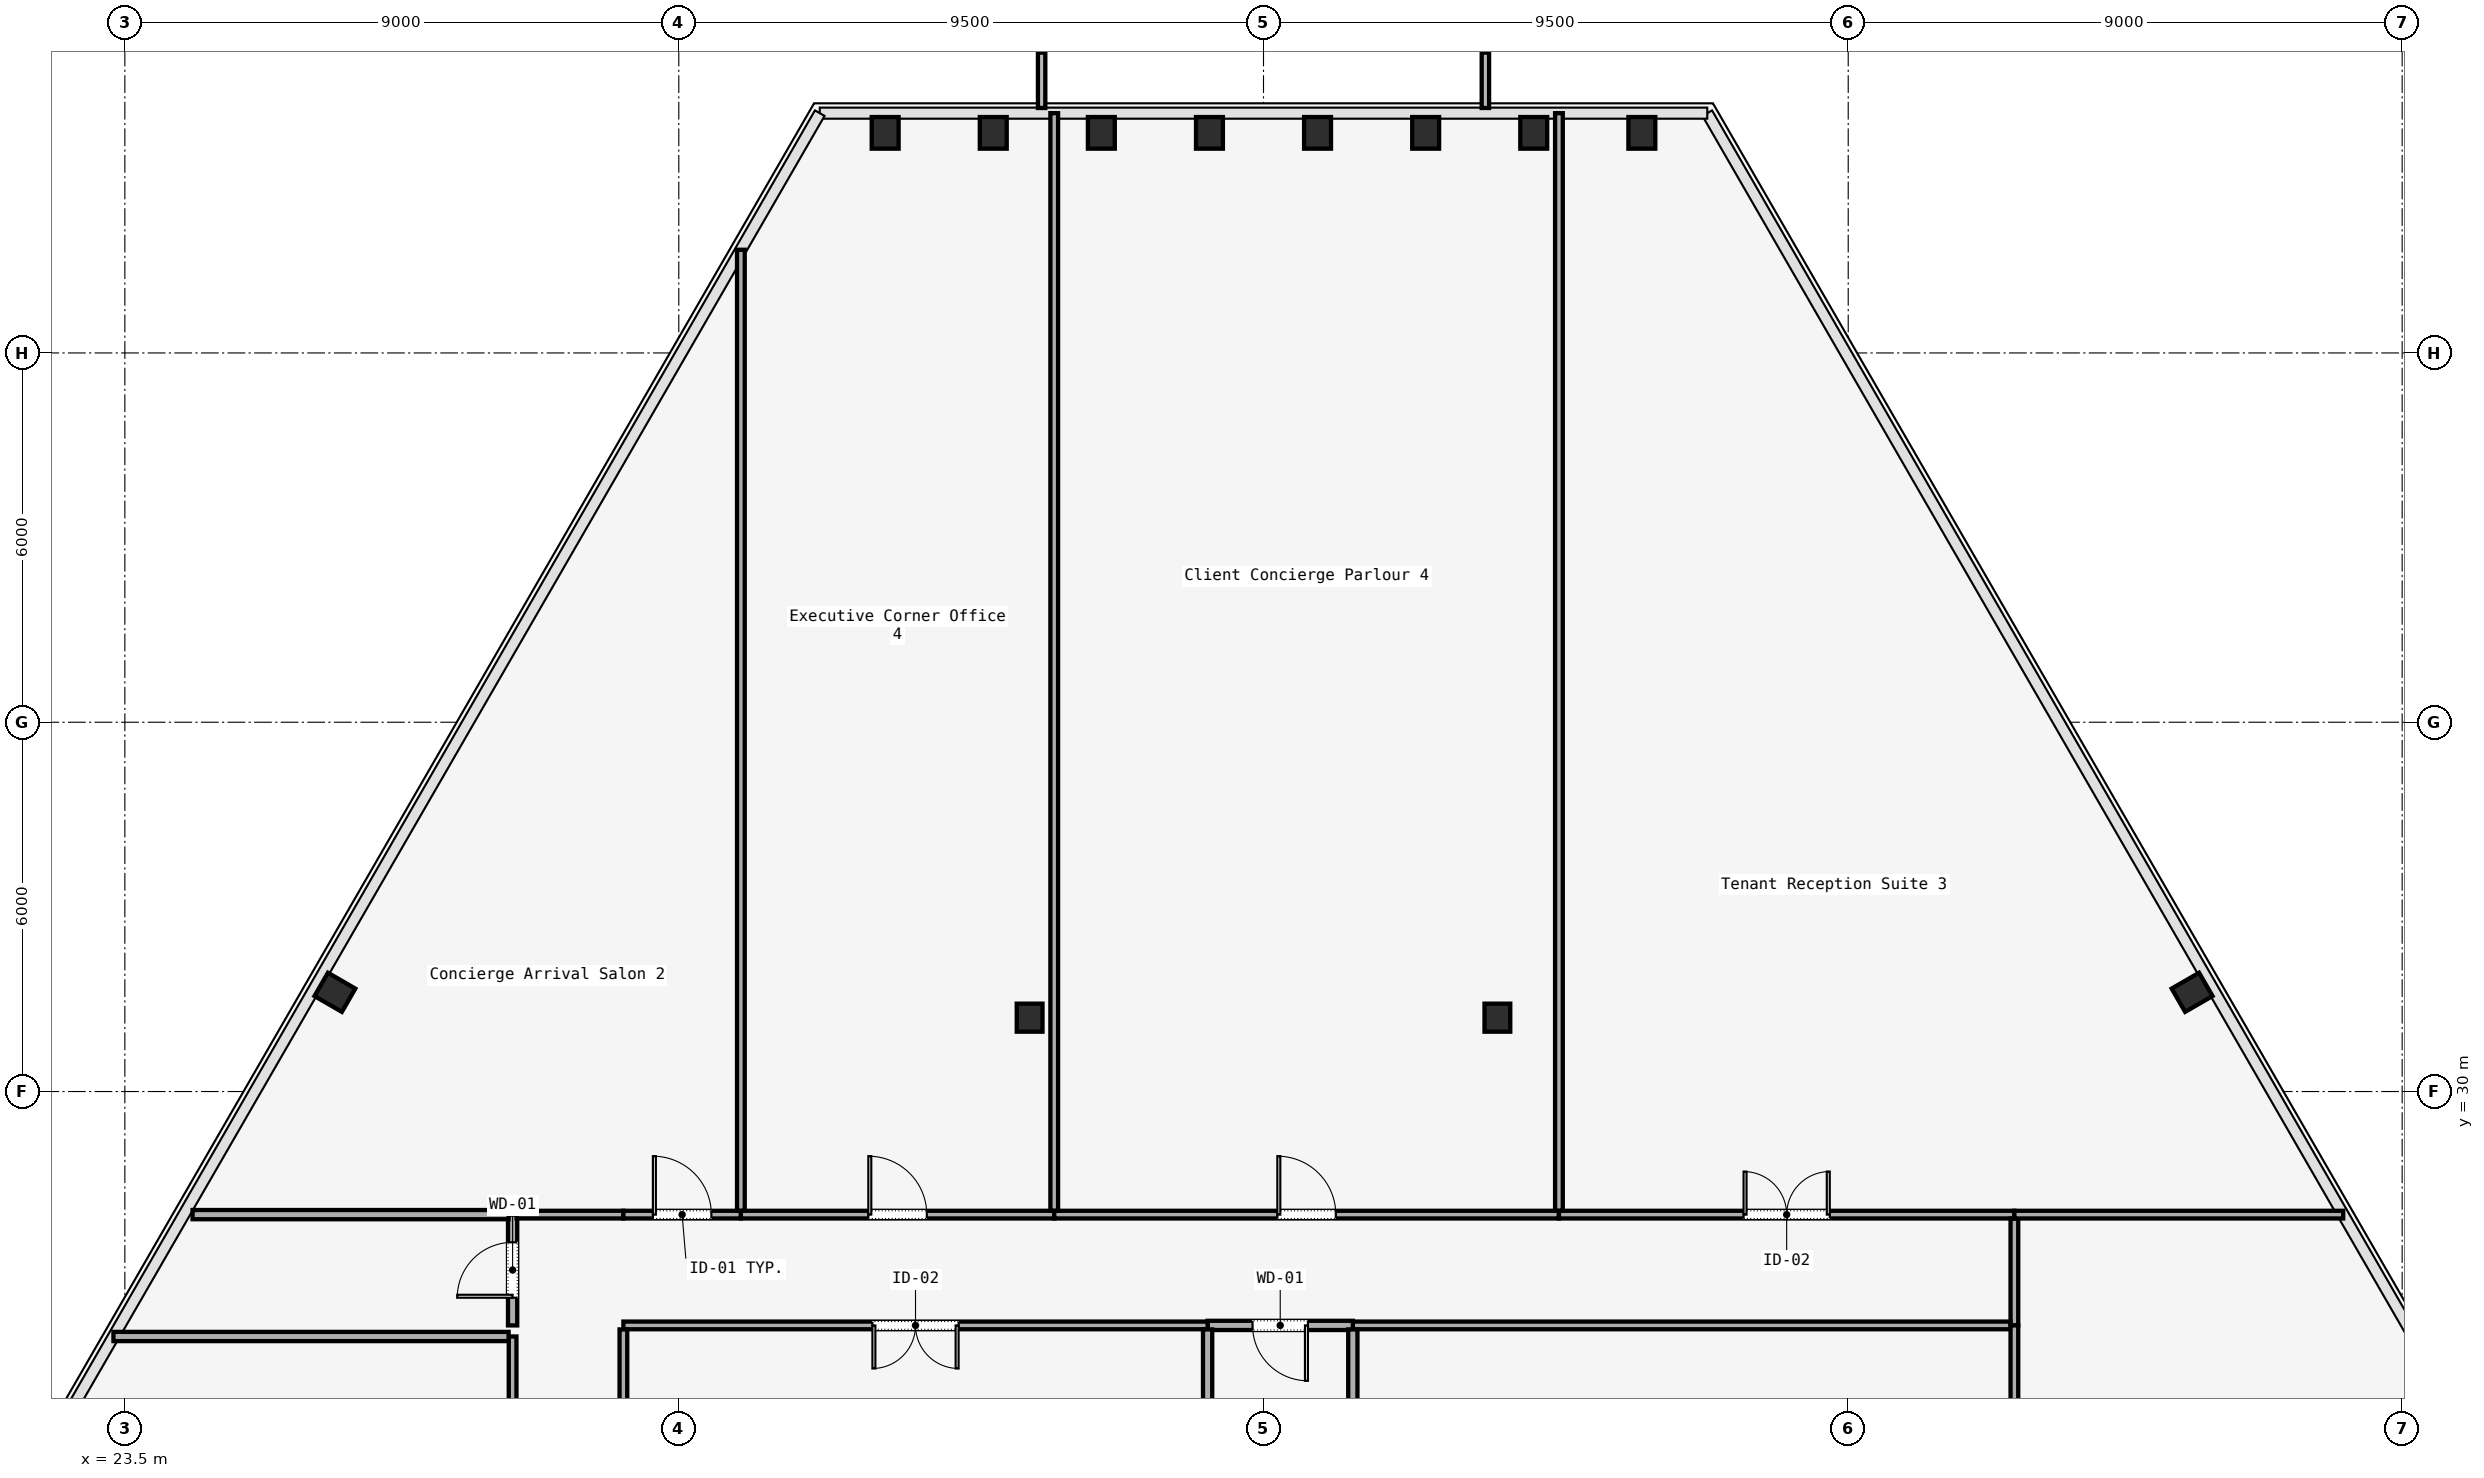
"""IFC4 building model, lengths in metres.
Left out: names, types, materials, properties, quantities, classifications, styles, units other than length and angle.
Written with IfcOpenShell. Run it as: python <this file> out.ifc"""

import sys

from ifc_helpers import new_model, si_unit, direction, frame, frame_2d, origin, origin_2d, place, context, subcontext, project, spatial, rectangle, i_section, extrude, element, fill, save


model = new_model("IFC4")
c1 = context("Model", 3, precision=1e-05, world=origin(), true_north=direction((0.0, 1.0)))
c2 = subcontext(c1, "Body", "Model", "MODEL_VIEW")
j1 = project(units=[si_unit("LENGTHUNIT", "METRE"), si_unit("PLANEANGLEUNIT", "RADIAN")], contexts=[c1])
p1 = place(None, origin())
s1 = spatial("IfcSite", under=j1, at=p1, CompositionType="ELEMENT")
p2 = place(p1, origin())
s2 = spatial("IfcBuilding", under=s1, at=p2, CompositionType="ELEMENT")
p3 = place(p2, frame((0.0, 0.0, 85.4)))
s3 = spatial("IfcBuildingStorey", under=s2, at=p3, CompositionType="ELEMENT", Elevation=85.4)
for number, where, z_axis, x_axis in (
    (1, (38.2, 31.2, 0.0), (0.0, 0.0, 1.0), (1.0, 0.0, 0.0)),
    (2, (45.8, 31.2, 0.0), (0.0, 0.0, 1.0), (1.0, 0.0, 0.0)),
):
    element("IfcColumn", number, at=place(p3, frame(where, z_axis=z_axis, x_axis=x_axis)), inside=s3, PredefinedType="COLUMN", context=c2, shape_type="SweptSolid", body=[
        extrude(i_section(OverallWidth=0.418, OverallDepth=0.456, WebThickness=0.042, FlangeThickness=0.067, FilletRadius=0.015, at=origin_2d()), origin(), (0.0, 0.0, 1.0), 3.58),
    ])
for number, where, z_axis, x_axis in (
    (3, (57.087, 31.612, 0.0), (0.0, 0.0, 1.0), (-0.5, 0.866, 0.0)),
    (4, (48.147, 45.576, 0.0), (0.0, 0.0, 1.0), (1.0, 0.0, 0.0)),
    (5, (46.391, 45.576, 0.0), (0.0, 0.0, 1.0), (1.0, 0.0, 0.0)),
    (6, (44.635, 45.576, 0.0), (0.0, 0.0, 1.0), (1.0, 0.0, 0.0)),
    (7, (42.878, 45.576, 0.0), (0.0, 0.0, 1.0), (1.0, 0.0, 0.0)),
    (8, (41.122, 45.576, 0.0), (0.0, 0.0, 1.0), (1.0, 0.0, 0.0)),
    (9, (39.365, 45.576, 0.0), (0.0, 0.0, 1.0), (1.0, 0.0, 0.0)),
    (10, (37.609, 45.576, 0.0), (0.0, 0.0, 1.0), (1.0, 0.0, 0.0)),
    (11, (35.853, 45.576, 0.0), (0.0, 0.0, 1.0), (1.0, 0.0, 0.0)),
    (12, (26.913, 31.612, 0.0), (0.0, 0.0, 1.0), (0.5, 0.866, 0.0)),
):
    element("IfcColumn", number, at=place(p3, frame(where, z_axis=z_axis, x_axis=x_axis)), inside=s3, PredefinedType="COLUMN", context=c2, shape_type="SweptSolid", body=[
        extrude(i_section(OverallWidth=0.437, OverallDepth=0.514, WebThickness=0.061, FlangeThickness=0.077, FilletRadius=0.015, at=origin_2d()), origin(), (0.0, 0.0, 1.0), 3.58),
    ])
p4 = place(p3, frame((29.8, 17.065, 0.0), z_axis=(0.0, 0.0, 1.0), x_axis=(0.0, 1.0, 0.0)))
e13 = element("IfcWall", 13, at=p4, inside=s3, PredefinedType="PARTITIONING", context=c2, shape_type="SweptSolid", body=[
    extrude(rectangle(XDim=8.955, YDim=0.125, at=frame_2d((4.478, 0.0))), origin(), (0.0, 0.0, 1.0), 2.95),
])
p5 = place(p4, frame((4.002, 0.0, 0.0)))
e14 = element("IfcOpeningElement", 14, at=p5, cuts=e13, PredefinedType="OPENING", context=c2, shape_type="SweptSolid", body=[
    extrude(rectangle(XDim=0.95, YDim=2.2, at=frame_2d((0.475, 1.1))), frame((0.0, 0.062, 0.0), z_axis=(0.0, -1.0, 0.0), x_axis=(1.0, 0.0, 0.0)), (0.0, 0.0, 1.0), 0.125),
])
p6 = place(p3, frame((29.8, 26.2, 0.0), z_axis=(0.0, 0.0, 1.0), x_axis=(0.0, 1.0, 0.0)))
e15 = element("IfcWall", 15, at=p6, inside=s3, PredefinedType="PARTITIONING", context=c2, shape_type="SweptSolid", body=[
    extrude(rectangle(XDim=1.8, YDim=0.15, at=frame_2d((0.9, 0.0))), origin(), (0.0, 0.0, 1.0), 2.95),
])
p7 = place(p6, frame((0.45, 0.0, 0.0)))
e16 = element("IfcOpeningElement", 16, at=p7, cuts=e15, PredefinedType="OPENING", context=c2, shape_type="SweptSolid", body=[
    extrude(rectangle(XDim=0.9, YDim=2.15, at=frame_2d((0.45, 1.075))), frame((0.0, 0.075, 0.0), z_axis=(0.0, -1.0, 0.0), x_axis=(1.0, 0.0, 0.0)), (0.0, 0.0, 1.0), 0.15),
])
p8 = place(p3, frame((29.865, 28.0, 0.0), z_axis=(0.0, 0.0, 1.0), x_axis=(1.0, 0.0, 0.0)))
e17 = element("IfcWall", 17, at=p8, inside=s3, PredefinedType="PARTITIONING", context=c2, shape_type="SweptSolid", body=[
    extrude(rectangle(XDim=1.735, YDim=0.125, at=frame_2d((0.868, 0.0))), origin(), (0.0, 0.0, 1.0), 2.95),
])
p9 = place(p3, frame((31.6, 28.0, 0.0), z_axis=(0.0, 0.0, 1.0), x_axis=(1.0, 0.0, 0.0)))
e18 = element("IfcWall", 18, at=p9, inside=s3, PredefinedType="PARTITIONING", context=c2, shape_type="SweptSolid", body=[
    extrude(rectangle(XDim=1.909, YDim=0.125, at=frame_2d((0.954, 0.0))), origin(), (0.0, 0.0, 1.0), 2.95),
])
p10 = place(p9, frame((0.479, 0.0, 0.0)))
e19 = element("IfcOpeningElement", 19, at=p10, cuts=e18, PredefinedType="OPENING", context=c2, shape_type="SweptSolid", body=[
    extrude(rectangle(XDim=0.95, YDim=2.2, at=frame_2d((0.475, 1.1))), frame((0.0, 0.062, 0.0), z_axis=(0.0, -1.0, 0.0), x_axis=(1.0, 0.0, 0.0)), (0.0, 0.0, 1.0), 0.125),
])
p11 = place(p3, frame((33.509, 28.0, 0.0), z_axis=(0.0, 0.0, 1.0), x_axis=(1.0, 0.0, 0.0)))
e20 = element("IfcWall", 20, at=p11, inside=s3, PredefinedType="PARTITIONING", context=c2, shape_type="SweptSolid", body=[
    extrude(rectangle(XDim=5.091, YDim=0.125, at=frame_2d((2.546, 0.0))), origin(), (0.0, 0.0, 1.0), 2.95),
])
p12 = place(p11, frame((2.071, 0.0, 0.0)))
e21 = element("IfcOpeningElement", 21, at=p12, cuts=e20, PredefinedType="OPENING", context=c2, shape_type="SweptSolid", body=[
    extrude(rectangle(XDim=0.95, YDim=2.2, at=frame_2d((0.475, 1.1))), frame((0.0, 0.062, 0.0), z_axis=(0.0, -1.0, 0.0), x_axis=(1.0, 0.0, 0.0)), (0.0, 0.0, 1.0), 0.125),
])
p13 = place(p3, frame((38.6, 28.0, 0.0), z_axis=(0.0, 0.0, 1.0), x_axis=(1.0, 0.0, 0.0)))
e22 = element("IfcWall", 22, at=p13, inside=s3, PredefinedType="PARTITIONING", context=c2, shape_type="SweptSolid", body=[
    extrude(rectangle(XDim=8.2, YDim=0.125, at=frame_2d((4.1, 0.0))), origin(), (0.0, 0.0, 1.0), 2.95),
])
p14 = place(p13, frame((3.625, 0.0, 0.0)))
e23 = element("IfcOpeningElement", 23, at=p14, cuts=e22, PredefinedType="OPENING", context=c2, shape_type="SweptSolid", body=[
    extrude(rectangle(XDim=0.95, YDim=2.2, at=frame_2d((0.475, 1.1))), frame((0.0, 0.062, 0.0), z_axis=(0.0, -1.0, 0.0), x_axis=(1.0, 0.0, 0.0)), (0.0, 0.0, 1.0), 0.125),
])
p15 = place(p3, frame((46.8, 28.0, 0.0), z_axis=(0.0, 0.0, 1.0), x_axis=(1.0, 0.0, 0.0)))
e24 = element("IfcWall", 24, at=p15, inside=s3, PredefinedType="PARTITIONING", context=c2, shape_type="SweptSolid", body=[
    extrude(rectangle(XDim=7.4, YDim=0.125, at=frame_2d((3.7, 0.0))), origin(), (0.0, 0.0, 1.0), 2.95),
])
p16 = place(p15, frame((3.0, 0.0, 0.0)))
e25 = element("IfcOpeningElement", 25, at=p16, cuts=e24, PredefinedType="OPENING", context=c2, shape_type="SweptSolid", body=[
    extrude(rectangle(XDim=1.4, YDim=2.2, at=frame_2d((0.7, 1.1))), frame((0.0, 0.062, 0.0), z_axis=(0.0, -1.0, 0.0), x_axis=(1.0, 0.0, 0.0)), (0.0, 0.0, 1.0), 0.125),
])
p17 = place(p3, frame((54.2, 27.935, 0.0), z_axis=(0.0, 0.0, 1.0), x_axis=(0.0, -1.0, 0.0)))
e26 = element("IfcWall", 26, at=p17, inside=s3, PredefinedType="PARTITIONING", context=c2, shape_type="SweptSolid", body=[
    extrude(rectangle(XDim=1.735, YDim=0.125, at=frame_2d((0.868, 0.0))), origin(), (0.0, 0.0, 1.0), 2.95),
])
p18 = place(p3, frame((54.135, 26.2, 0.0), z_axis=(0.0, 0.0, 1.0), x_axis=(-1.0, 0.0, 0.0)))
e27 = element("IfcWall", 27, at=p18, inside=s3, PredefinedType="PARTITIONING", context=c2, shape_type="SweptSolid", body=[
    extrude(rectangle(XDim=10.684, YDim=0.125, at=frame_2d((5.342, 0.0))), origin(), (0.0, 0.0, 1.0), 2.95),
])
p19 = place(p3, frame((43.451, 26.2, 0.0), z_axis=(0.0, 0.0, 1.0), x_axis=(-1.0, 0.0, 0.0)))
e28 = element("IfcWall", 28, at=p19, inside=s3, PredefinedType="PARTITIONING", context=c2, shape_type="SweptSolid", body=[
    extrude(rectangle(XDim=2.359, YDim=0.15, at=frame_2d((1.18, 0.0))), origin(), (0.0, 0.0, 1.0), 2.95),
])
p20 = place(p19, frame((0.73, 0.0, 0.0)))
e29 = element("IfcOpeningElement", 29, at=p20, cuts=e28, PredefinedType="OPENING", context=c2, shape_type="SweptSolid", body=[
    extrude(rectangle(XDim=0.9, YDim=2.15, at=frame_2d((0.45, 1.075))), frame((0.0, 0.075, 0.0), z_axis=(0.0, -1.0, 0.0), x_axis=(1.0, 0.0, 0.0)), (0.0, 0.0, 1.0), 0.15),
])
p21 = place(p3, frame((41.092, 26.2, 0.0), z_axis=(0.0, 0.0, 1.0), x_axis=(-1.0, 0.0, 0.0)))
e30 = element("IfcWall", 30, at=p21, inside=s3, PredefinedType="PARTITIONING", context=c2, shape_type="SweptSolid", body=[
    extrude(rectangle(XDim=9.492, YDim=0.125, at=frame_2d((4.746, 0.0))), origin(), (0.0, 0.0, 1.0), 2.95),
])
p22 = place(p21, frame((4.046, 0.0, 0.0)))
e31 = element("IfcOpeningElement", 31, at=p22, cuts=e30, PredefinedType="OPENING", context=c2, shape_type="SweptSolid", body=[
    extrude(rectangle(XDim=1.4, YDim=2.2, at=frame_2d((0.7, 1.1))), frame((0.0, 0.062, 0.0), z_axis=(0.0, -1.0, 0.0), x_axis=(1.0, 0.0, 0.0)), (0.0, 0.0, 1.0), 0.125),
])
p23 = place(p3, frame((31.6, 26.135, 0.0), z_axis=(0.0, 0.0, 1.0), x_axis=(0.0, -1.0, 0.0)))
e32 = element("IfcWall", 32, at=p23, inside=s3, PredefinedType="PARTITIONING", context=c2, shape_type="SweptSolid", body=[
    extrude(rectangle(XDim=9.135, YDim=0.125, at=frame_2d((4.567, 0.0))), origin(), (0.0, 0.0, 1.0), 2.95),
])
p24 = place(p3, frame((23.315, 26.02, 0.0), z_axis=(0.0, 0.0, 1.0), x_axis=(1.0, 0.0, 0.0)))
e33 = element("IfcWall", 33, at=p24, inside=s3, PredefinedType="PARTITIONING", context=c2, shape_type="SweptSolid", body=[
    extrude(rectangle(XDim=6.42, YDim=0.15, at=frame_2d((3.21, 0.0))), origin(), (0.0, 0.0, 1.0), 2.95),
])
for number, where, z_axis, x_axis in (
    (34, (41.092, 26.135, 0.0), (0.0, 0.0, 1.0), (0.0, -1.0, 0.0)),
    (35, (43.451, 26.135, 0.0), (0.0, 0.0, 1.0), (0.0, -1.0, 0.0)),
):
    element("IfcWall", number, at=place(p3, frame(where, z_axis=z_axis, x_axis=x_axis)), inside=s3, PredefinedType="PARTITIONING", context=c2, shape_type="SweptSolid", body=[
        extrude(rectangle(XDim=9.07, YDim=0.15, at=frame_2d((4.535, 0.0))), origin(), (0.0, 0.0, 1.0), 2.95),
    ])
p25 = place(p3, frame((54.2, 26.2, 0.0), z_axis=(0.0, 0.0, 1.0), x_axis=(0.0, -1.0, 0.0)))
e36 = element("IfcWall", 36, at=p25, inside=s3, PredefinedType="PARTITIONING", context=c2, shape_type="SweptSolid", body=[
    extrude(rectangle(XDim=9.135, YDim=0.125, at=frame_2d((4.567, 0.0))), origin(), (0.0, 0.0, 1.0), 2.95),
])
p26 = place(p3, frame((54.2, 28.0, 0.0), z_axis=(0.0, 0.0, 1.0), x_axis=(1.0, 0.0, 0.0)))
e37 = element("IfcWall", 37, at=p26, inside=s3, PredefinedType="PARTITIONING", context=c2, shape_type="SweptSolid", body=[
    extrude(rectangle(XDim=5.342, YDim=0.125, at=frame_2d((2.671, 0.0))), origin(), (0.0, 0.0, 1.0), 2.95),
])
p27 = place(p3, frame((24.6, 28.0, 0.0), z_axis=(0.0, 0.0, 1.0), x_axis=(1.0, 0.0, 0.0)))
e38 = element("IfcWall", 38, at=p27, inside=s3, PredefinedType="PARTITIONING", context=c2, shape_type="SweptSolid", body=[
    extrude(rectangle(XDim=5.135, YDim=0.15, at=frame_2d((2.567, 0.0))), origin(), (0.0, 0.0, 1.0), 2.95),
])
p28 = place(p3, frame((33.509, 43.677, 0.0), z_axis=(0.0, 0.0, 1.0), x_axis=(0.0, -1.0, 0.0)))
e39 = element("IfcWall", 39, at=p28, inside=s3, PredefinedType="PARTITIONING", context=c2, shape_type="SweptSolid", body=[
    extrude(rectangle(XDim=15.612, YDim=0.125, at=frame_2d((7.806, 0.0))), origin(), (0.0, 0.0, 1.0), 2.95),
])
for number, where, z_axis, x_axis in (
    (40, (46.8, 28.065, 0.0), (0.0, 0.0, 1.0), (0.0, 1.0, 0.0)),
    (41, (38.6, 45.896, 0.0), (0.0, 0.0, 1.0), (0.0, -1.0, 0.0)),
):
    element("IfcWall", number, at=place(p3, frame(where, z_axis=z_axis, x_axis=x_axis)), inside=s3, PredefinedType="PARTITIONING", context=c2, shape_type="SweptSolid", body=[
        extrude(rectangle(XDim=17.831, YDim=0.125, at=frame_2d((8.916, 0.0))), origin(), (0.0, 0.0, 1.0), 2.95),
    ])
p29 = place(p22, origin())
e42 = element("IfcDoor", 42, at=p29, inside=s3, OperationType="SINGLE_SWING_LEFT", PredefinedType="DOOR", context=c2, shape_type="SweptSolid", body=[
    extrude(rectangle(XDim=1.4, YDim=2.2, at=frame_2d((0.7, 1.1))), frame((0.0, 0.025, 0.0), z_axis=(0.0, -1.0, 0.0), x_axis=(1.0, 0.0, 0.0)), (0.0, 0.0, 1.0), 0.05),
])
fill(e31, e42)
p30 = place(p20, origin())
e43 = element("IfcDoor", 43, at=p30, inside=s3, OperationType="SINGLE_SWING_RIGHT", PredefinedType="DOOR", context=c2, shape_type="SweptSolid", body=[
    extrude(rectangle(XDim=0.9, YDim=2.15, at=frame_2d((0.45, 1.075))), frame((0.0, 0.025, 0.0), z_axis=(0.0, -1.0, 0.0), x_axis=(1.0, 0.0, 0.0)), (0.0, 0.0, 1.0), 0.05),
])
fill(e29, e43)
p31 = place(p7, origin())
e44 = element("IfcDoor", 44, at=p31, inside=s3, OperationType="SINGLE_SWING_LEFT", PredefinedType="DOOR", context=c2, shape_type="SweptSolid", body=[
    extrude(rectangle(XDim=0.9, YDim=2.15, at=frame_2d((0.45, 1.075))), frame((0.0, 0.025, 0.0), z_axis=(0.0, -1.0, 0.0), x_axis=(1.0, 0.0, 0.0)), (0.0, 0.0, 1.0), 0.05),
])
fill(e16, e44)
p32 = place(p10, origin())
e45 = element("IfcDoor", 45, at=p32, inside=s3, OperationType="SINGLE_SWING_RIGHT", PredefinedType="DOOR", context=c2, shape_type="SweptSolid", body=[
    extrude(rectangle(XDim=0.95, YDim=2.2, at=frame_2d((0.475, 1.1))), frame((0.0, 0.025, 0.0), z_axis=(0.0, -1.0, 0.0), x_axis=(1.0, 0.0, 0.0)), (0.0, 0.0, 1.0), 0.05),
])
fill(e19, e45)
p33 = place(p16, origin())
e46 = element("IfcDoor", 46, at=p33, inside=s3, OperationType="SINGLE_SWING_LEFT", PredefinedType="DOOR", context=c2, shape_type="SweptSolid", body=[
    extrude(rectangle(XDim=1.4, YDim=2.2, at=frame_2d((0.7, 1.1))), frame((0.0, 0.025, 0.0), z_axis=(0.0, -1.0, 0.0), x_axis=(1.0, 0.0, 0.0)), (0.0, 0.0, 1.0), 0.05),
])
fill(e25, e46)
p34 = place(p12, origin())
e47 = element("IfcDoor", 47, at=p34, inside=s3, OperationType="SINGLE_SWING_RIGHT", PredefinedType="DOOR", context=c2, shape_type="SweptSolid", body=[
    extrude(rectangle(XDim=0.95, YDim=2.2, at=frame_2d((0.475, 1.1))), frame((0.0, 0.025, 0.0), z_axis=(0.0, -1.0, 0.0), x_axis=(1.0, 0.0, 0.0)), (0.0, 0.0, 1.0), 0.05),
])
fill(e21, e47)
p35 = place(p14, origin())
e48 = element("IfcDoor", 48, at=p35, inside=s3, OperationType="SINGLE_SWING_LEFT", PredefinedType="DOOR", context=c2, shape_type="SweptSolid", body=[
    extrude(rectangle(XDim=0.95, YDim=2.2, at=frame_2d((0.475, 1.1))), frame((0.0, 0.025, 0.0), z_axis=(0.0, -1.0, 0.0), x_axis=(1.0, 0.0, 0.0)), (0.0, 0.0, 1.0), 0.05),
])
fill(e23, e48)
save(model, sys.argv[1])
